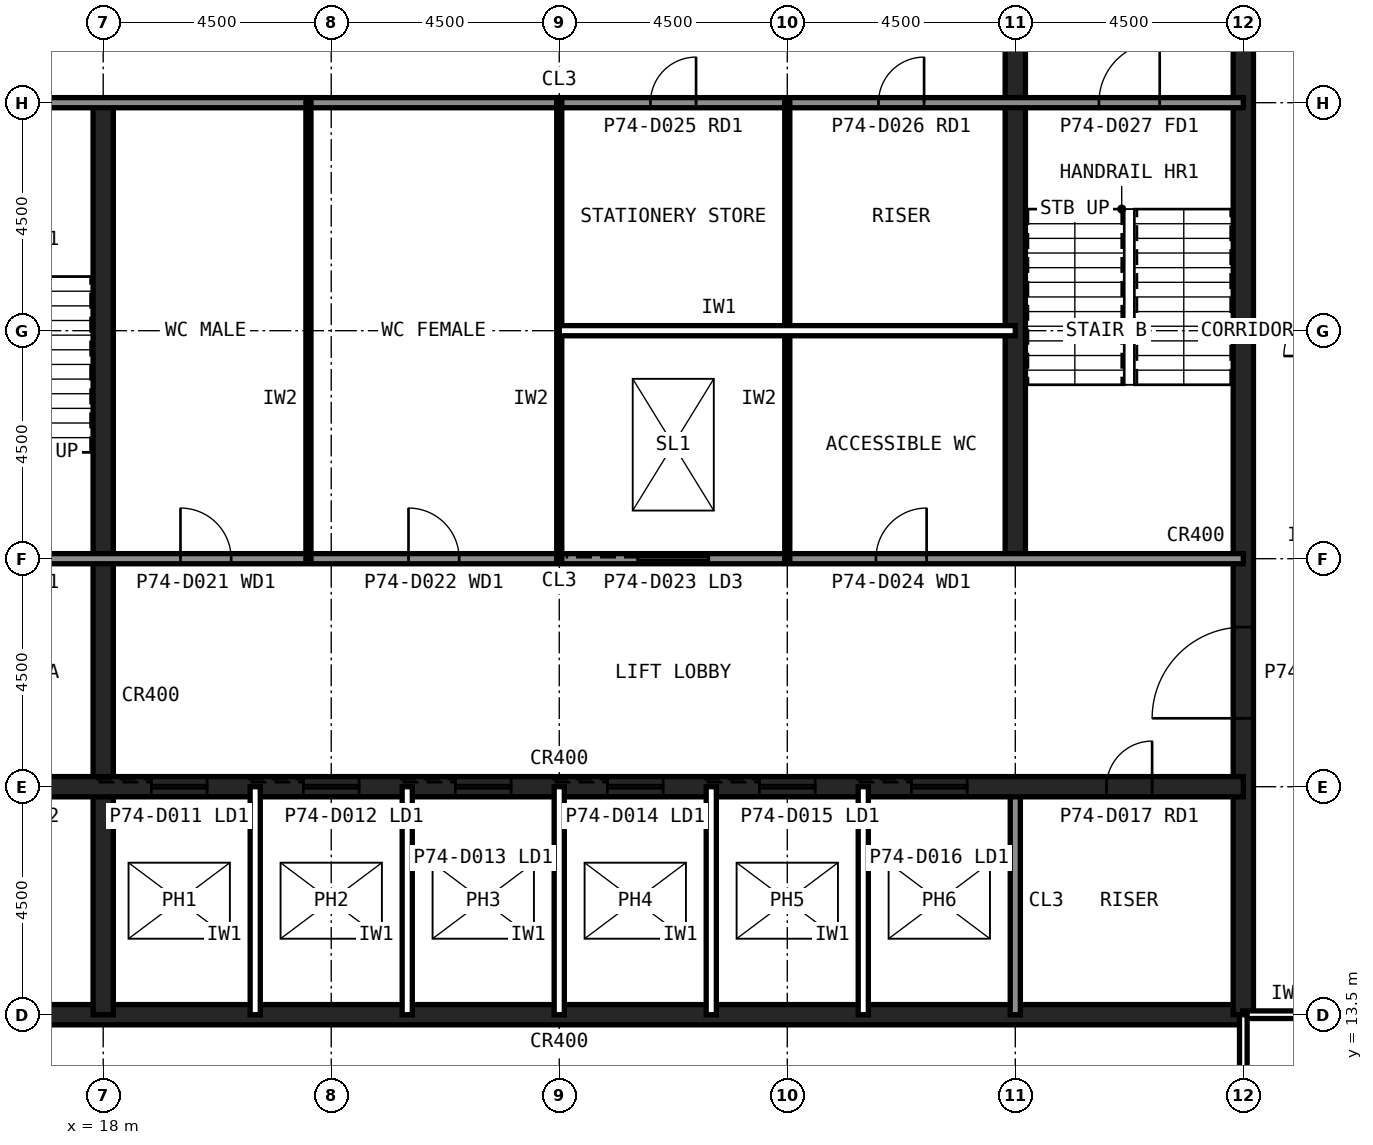
"""IFC4 building model, lengths in metres.
Left out: names, types, materials, properties, quantities, classifications, styles, units other than length and angle.
Written with IfcOpenShell. Run it as: python <this file> out.ifc"""

import sys

from ifc_helpers import new_model, si_unit, direction, frame, frame_2d, origin, place, context, subcontext, project, spatial, rectangle, extrude, element, fill, save


model = new_model("IFC4")
c1 = context("Model", 3, precision=1e-05, world=origin(), true_north=direction((0.0, 1.0)))
c2 = subcontext(c1, "Body", "Model", "MODEL_VIEW")
j1 = project(units=[si_unit("LENGTHUNIT", "METRE"), si_unit("PLANEANGLEUNIT", "RADIAN")], contexts=[c1])
p1 = place(None, origin())
s1 = spatial("IfcSite", under=j1, at=p1, CompositionType="ELEMENT")
p2 = place(p1, origin())
s2 = spatial("IfcBuilding", under=s1, at=p2, CompositionType="ELEMENT")
p3 = place(p2, frame((0.0, 0.0, 310.6)))
s3 = spatial("IfcBuildingStorey", under=s2, at=p3, CompositionType="ELEMENT", Elevation=310.6)
p4 = place(p3, frame((13.5, 13.5, 0.0), z_axis=(0.0, 0.0, 1.0), x_axis=(1.0, 0.0, 0.0)))
e1 = element("IfcWall", 1, at=p4, inside=s3, PredefinedType="SHEAR", context=c2, shape_type="SweptSolid", body=[
    extrude(rectangle(XDim=27.0, YDim=0.4, at=frame_2d((13.5, 0.0))), origin(), (0.0, 0.0, 1.0), 4.5),
])
p5 = place(p3, frame((40.5, 13.5, 0.0), z_axis=(0.0, 0.0, 1.0), x_axis=(0.0, 1.0, 0.0)))
e2 = element("IfcWall", 2, at=p5, inside=s3, PredefinedType="SHEAR", context=c2, shape_type="SweptSolid", body=[
    extrude(rectangle(XDim=27.0, YDim=0.4, at=frame_2d((13.5, 0.0))), origin(), (0.0, 0.0, 1.0), 4.5),
])
p6 = place(p5, frame((5.85, 0.0, 0.0)))
e3 = element("IfcOpeningElement", 3, at=p6, cuts=e2, PredefinedType="OPENING", context=c2, shape_type="SweptSolid", body=[
    extrude(rectangle(XDim=1.8, YDim=2.1, at=frame_2d((0.9, 1.05))), frame((0.0, 0.21, 0.0), z_axis=(0.0, -1.0, 0.0), x_axis=(1.0, 0.0, 0.0)), (0.0, 0.0, 1.0), 0.42),
])
p7 = place(p5, frame((19.65, 0.0, 0.0)))
e4 = element("IfcOpeningElement", 4, at=p7, cuts=e2, PredefinedType="OPENING", context=c2, shape_type="SweptSolid", body=[
    extrude(rectangle(XDim=1.2, YDim=2.1, at=frame_2d((0.6, 1.05))), frame((0.0, 0.21, 0.0), z_axis=(0.0, -1.0, 0.0), x_axis=(1.0, 0.0, 0.0)), (0.0, 0.0, 1.0), 0.42),
])
p8 = place(p3, frame((18.0, 13.5, 0.0), z_axis=(0.0, 0.0, 1.0), x_axis=(0.0, 1.0, 0.0)))
e5 = element("IfcWall", 5, at=p8, inside=s3, PredefinedType="SHEAR", context=c2, shape_type="SweptSolid", body=[
    extrude(rectangle(XDim=18.0, YDim=0.4, at=frame_2d((9.0, 0.0))), origin(), (0.0, 0.0, 1.0), 4.5),
])
p9 = place(p3, frame((36.0, 13.5, 0.0), z_axis=(0.0, 0.0, 1.0), x_axis=(0.0, 1.0, 0.0)))
e6 = element("IfcWall", 6, at=p9, inside=s3, PredefinedType="SOLIDWALL", context=c2, shape_type="SweptSolid", body=[
    extrude(rectangle(XDim=4.5, YDim=0.2, at=frame_2d((2.25, 0.0))), origin(), (0.0, 0.0, 1.0), 4.32),
])
p10 = place(p3, frame((36.0, 22.5, 0.0), z_axis=(0.0, 0.0, 1.0), x_axis=(0.0, 1.0, 0.0)))
e7 = element("IfcWall", 7, at=p10, inside=s3, PredefinedType="SHEAR", context=c2, shape_type="SweptSolid", body=[
    extrude(rectangle(XDim=18.0, YDim=0.4, at=frame_2d((9.0, 0.0))), origin(), (0.0, 0.0, 1.0), 4.5),
])
p11 = place(p3, frame((13.5, 18.0, 0.0), z_axis=(0.0, 0.0, 1.0), x_axis=(1.0, 0.0, 0.0)))
e8 = element("IfcWall", 8, at=p11, inside=s3, PredefinedType="SHEAR", context=c2, shape_type="SweptSolid", body=[
    extrude(rectangle(XDim=27.0, YDim=0.4, at=frame_2d((13.5, 0.0))), origin(), (0.0, 0.0, 1.0), 4.5),
])
p12 = place(p11, frame((24.3, 0.0, 0.0)))
e9 = element("IfcOpeningElement", 9, at=p12, cuts=e8, PredefinedType="OPENING", context=c2, shape_type="SweptSolid", body=[
    extrude(rectangle(XDim=0.9, YDim=2.1, at=frame_2d((0.45, 1.05))), frame((0.0, 0.21, 0.0), z_axis=(0.0, -1.0, 0.0), x_axis=(1.0, 0.0, 0.0)), (0.0, 0.0, 1.0), 0.42),
])
p13 = place(p11, frame((5.45, 0.0, 0.0)))
e10 = element("IfcOpeningElement", 10, at=p13, cuts=e8, PredefinedType="OPENING", context=c2, shape_type="SweptSolid", body=[
    extrude(rectangle(XDim=1.1, YDim=2.1, at=frame_2d((0.55, 1.05))), frame((0.0, 0.21, 0.0), z_axis=(0.0, -1.0, 0.0), x_axis=(1.0, 0.0, 0.0)), (0.0, 0.0, 1.0), 0.42),
])
p14 = place(p11, frame((8.45, 0.0, 0.0)))
e11 = element("IfcOpeningElement", 11, at=p14, cuts=e8, PredefinedType="OPENING", context=c2, shape_type="SweptSolid", body=[
    extrude(rectangle(XDim=1.1, YDim=2.1, at=frame_2d((0.55, 1.05))), frame((0.0, 0.21, 0.0), z_axis=(0.0, -1.0, 0.0), x_axis=(1.0, 0.0, 0.0)), (0.0, 0.0, 1.0), 0.42),
])
p15 = place(p11, frame((11.45, 0.0, 0.0)))
e12 = element("IfcOpeningElement", 12, at=p15, cuts=e8, PredefinedType="OPENING", context=c2, shape_type="SweptSolid", body=[
    extrude(rectangle(XDim=1.1, YDim=2.1, at=frame_2d((0.55, 1.05))), frame((0.0, 0.21, 0.0), z_axis=(0.0, -1.0, 0.0), x_axis=(1.0, 0.0, 0.0)), (0.0, 0.0, 1.0), 0.42),
])
p16 = place(p11, frame((14.45, 0.0, 0.0)))
e13 = element("IfcOpeningElement", 13, at=p16, cuts=e8, PredefinedType="OPENING", context=c2, shape_type="SweptSolid", body=[
    extrude(rectangle(XDim=1.1, YDim=2.1, at=frame_2d((0.55, 1.05))), frame((0.0, 0.21, 0.0), z_axis=(0.0, -1.0, 0.0), x_axis=(1.0, 0.0, 0.0)), (0.0, 0.0, 1.0), 0.42),
])
p17 = place(p11, frame((17.45, 0.0, 0.0)))
e14 = element("IfcOpeningElement", 14, at=p17, cuts=e8, PredefinedType="OPENING", context=c2, shape_type="SweptSolid", body=[
    extrude(rectangle(XDim=1.1, YDim=2.1, at=frame_2d((0.55, 1.05))), frame((0.0, 0.21, 0.0), z_axis=(0.0, -1.0, 0.0), x_axis=(1.0, 0.0, 0.0)), (0.0, 0.0, 1.0), 0.42),
])
p18 = place(p11, frame((20.45, 0.0, 0.0)))
e15 = element("IfcOpeningElement", 15, at=p18, cuts=e8, PredefinedType="OPENING", context=c2, shape_type="SweptSolid", body=[
    extrude(rectangle(XDim=1.1, YDim=2.1, at=frame_2d((0.55, 1.05))), frame((0.0, 0.21, 0.0), z_axis=(0.0, -1.0, 0.0), x_axis=(1.0, 0.0, 0.0)), (0.0, 0.0, 1.0), 0.42),
])
p19 = place(p11, frame((1.6, 0.0, 0.0)))
e16 = element("IfcOpeningElement", 16, at=p19, cuts=e8, PredefinedType="OPENING", context=c2, shape_type="SweptSolid", body=[
    extrude(rectangle(XDim=1.3, YDim=2.2, at=frame_2d((0.65, 1.1))), frame((0.0, 0.21, 0.0), z_axis=(0.0, -1.0, 0.0), x_axis=(1.0, 0.0, 0.0)), (0.0, 0.0, 1.0), 0.42),
])
p20 = place(p3, frame((13.5, 22.5, 0.0), z_axis=(0.0, 0.0, 1.0), x_axis=(1.0, 0.0, 0.0)))
e17 = element("IfcWall", 17, at=p20, inside=s3, PredefinedType="SOLIDWALL", context=c2, shape_type="SweptSolid", body=[
    extrude(rectangle(XDim=27.0, YDim=0.2, at=frame_2d((13.5, 0.0))), origin(), (0.0, 0.0, 1.0), 4.32),
])
p21 = place(p20, frame((1.65, 0.0, 0.0)))
e18 = element("IfcOpeningElement", 18, at=p21, cuts=e17, PredefinedType="OPENING", context=c2, shape_type="SweptSolid", body=[
    extrude(rectangle(XDim=1.2, YDim=2.1, at=frame_2d((0.6, 1.05))), frame((0.0, 0.11, 0.0), z_axis=(0.0, -1.0, 0.0), x_axis=(1.0, 0.0, 0.0)), (0.0, 0.0, 1.0), 0.22),
])
p22 = place(p20, frame((6.025, 0.0, 0.0)))
e19 = element("IfcOpeningElement", 19, at=p22, cuts=e17, PredefinedType="OPENING", context=c2, shape_type="SweptSolid", body=[
    extrude(rectangle(XDim=1.0, YDim=2.1, at=frame_2d((0.5, 1.05))), frame((0.0, 0.11, 0.0), z_axis=(0.0, -1.0, 0.0), x_axis=(1.0, 0.0, 0.0)), (0.0, 0.0, 1.0), 0.22),
])
p23 = place(p20, frame((10.525, 0.0, 0.0)))
e20 = element("IfcOpeningElement", 20, at=p23, cuts=e17, PredefinedType="OPENING", context=c2, shape_type="SweptSolid", body=[
    extrude(rectangle(XDim=1.0, YDim=2.1, at=frame_2d((0.5, 1.05))), frame((0.0, 0.11, 0.0), z_axis=(0.0, -1.0, 0.0), x_axis=(1.0, 0.0, 0.0)), (0.0, 0.0, 1.0), 0.22),
])
p24 = place(p20, frame((19.75, 0.0, 0.0)))
e21 = element("IfcOpeningElement", 21, at=p24, cuts=e17, PredefinedType="OPENING", context=c2, shape_type="SweptSolid", body=[
    extrude(rectangle(XDim=1.0, YDim=2.1, at=frame_2d((0.5, 1.05))), frame((0.0, 0.11, 0.0), z_axis=(0.0, -1.0, 0.0), x_axis=(1.0, 0.0, 0.0)), (0.0, 0.0, 1.0), 0.22),
])
p25 = place(p20, frame((15.05, 0.0, 0.0)))
e22 = element("IfcOpeningElement", 22, at=p25, cuts=e17, PredefinedType="OPENING", context=c2, shape_type="SweptSolid", body=[
    extrude(rectangle(XDim=1.4, YDim=2.4, at=frame_2d((0.7, 1.2))), frame((0.0, 0.11, 0.0), z_axis=(0.0, -1.0, 0.0), x_axis=(1.0, 0.0, 0.0)), (0.0, 0.0, 1.0), 0.22),
])
p26 = place(p3, frame((13.5, 31.5, 0.0), z_axis=(0.0, 0.0, 1.0), x_axis=(1.0, 0.0, 0.0)))
e23 = element("IfcWall", 23, at=p26, inside=s3, PredefinedType="SOLIDWALL", context=c2, shape_type="SweptSolid", body=[
    extrude(rectangle(XDim=27.0, YDim=0.2, at=frame_2d((13.5, 0.0))), origin(), (0.0, 0.0, 1.0), 4.32),
])
p27 = place(p26, frame((24.15, 0.0, 0.0)))
e24 = element("IfcOpeningElement", 24, at=p27, cuts=e23, PredefinedType="OPENING", context=c2, shape_type="SweptSolid", body=[
    extrude(rectangle(XDim=1.2, YDim=2.1, at=frame_2d((0.6, 1.05))), frame((0.0, 0.11, 0.0), z_axis=(0.0, -1.0, 0.0), x_axis=(1.0, 0.0, 0.0)), (0.0, 0.0, 1.0), 0.22),
])
p28 = place(p26, frame((15.3, 0.0, 0.0)))
e25 = element("IfcOpeningElement", 25, at=p28, cuts=e23, PredefinedType="OPENING", context=c2, shape_type="SweptSolid", body=[
    extrude(rectangle(XDim=0.9, YDim=2.1, at=frame_2d((0.45, 1.05))), frame((0.0, 0.11, 0.0), z_axis=(0.0, -1.0, 0.0), x_axis=(1.0, 0.0, 0.0)), (0.0, 0.0, 1.0), 0.22),
])
p29 = place(p26, frame((19.8, 0.0, 0.0)))
e26 = element("IfcOpeningElement", 26, at=p29, cuts=e23, PredefinedType="OPENING", context=c2, shape_type="SweptSolid", body=[
    extrude(rectangle(XDim=0.9, YDim=2.1, at=frame_2d((0.45, 1.05))), frame((0.0, 0.11, 0.0), z_axis=(0.0, -1.0, 0.0), x_axis=(1.0, 0.0, 0.0)), (0.0, 0.0, 1.0), 0.22),
])
for number, where, z_axis, x_axis in (
    (27, (21.0, 13.5, 0.0), (0.0, 0.0, 1.0), (0.0, 1.0, 0.0)),
    (28, (24.0, 13.5, 0.0), (0.0, 0.0, 1.0), (0.0, 1.0, 0.0)),
    (29, (27.0, 13.5, 0.0), (0.0, 0.0, 1.0), (0.0, 1.0, 0.0)),
    (30, (30.0, 13.5, 0.0), (0.0, 0.0, 1.0), (0.0, 1.0, 0.0)),
    (31, (33.0, 13.5, 0.0), (0.0, 0.0, 1.0), (0.0, 1.0, 0.0)),
):
    element("IfcWall", number, at=place(p3, frame(where, z_axis=z_axis, x_axis=x_axis)), inside=s3, PredefinedType="PARTITIONING", context=c2, shape_type="SweptSolid", body=[
        extrude(rectangle(XDim=4.5, YDim=0.2, at=frame_2d((2.25, 0.0))), origin(), (0.0, 0.0, 1.0), 4.32),
    ])
for number, where, z_axis, x_axis in (
    (32, (22.05, 22.5, 0.0), (0.0, 0.0, 1.0), (0.0, 1.0, 0.0)),
    (33, (27.0, 22.5, 0.0), (0.0, 0.0, 1.0), (0.0, 1.0, 0.0)),
    (34, (31.5, 22.5, 0.0), (0.0, 0.0, 1.0), (0.0, 1.0, 0.0)),
):
    element("IfcWall", number, at=place(p3, frame(where, z_axis=z_axis, x_axis=x_axis)), inside=s3, PredefinedType="PLUMBINGWALL", context=c2, shape_type="SweptSolid", body=[
        extrude(rectangle(XDim=9.0, YDim=0.1, at=frame_2d((4.5, 0.0))), origin(), (0.0, 0.0, 1.0), 4.32),
    ])
p30 = place(p3, frame((27.0, 27.0, 0.0), z_axis=(0.0, 0.0, 1.0), x_axis=(1.0, 0.0, 0.0)))
e35 = element("IfcWall", 35, at=p30, inside=s3, PredefinedType="PARTITIONING", context=c2, shape_type="SweptSolid", body=[
    extrude(rectangle(XDim=9.0, YDim=0.2, at=frame_2d((4.5, 0.0))), origin(), (0.0, 0.0, 1.0), 4.32),
])
p31 = place(p3, frame((40.49, 13.5, 0.0), z_axis=(0.0, 0.0, 1.0), x_axis=(1.0, 0.0, 0.0)))
e36 = element("IfcWall", 36, at=p31, inside=s3, PredefinedType="PARTITIONING", context=c2, shape_type="SweptSolid", body=[
    extrude(rectangle(XDim=1.81, YDim=0.15, at=frame_2d((0.905, 0.0))), origin(), (0.0, 0.0, 1.0), 3.393),
])
p32 = place(p3, frame((40.5, 4.795, 0.0), z_axis=(0.0, 0.0, 1.0), x_axis=(0.0, 1.0, 0.0)))
e37 = element("IfcWall", 37, at=p32, inside=s3, PredefinedType="PARTITIONING", context=c2, shape_type="SweptSolid", body=[
    extrude(rectangle(XDim=8.705, YDim=0.15, at=frame_2d((4.353, 0.0))), origin(), (0.0, 0.0, 1.0), 3.393),
])
p33 = place(p32, frame((3.853, 0.0, 0.0)))
e38 = element("IfcOpeningElement", 38, at=p33, cuts=e37, PredefinedType="OPENING", context=c2, shape_type="SweptSolid", body=[
    extrude(rectangle(XDim=1.0, YDim=2.1, at=frame_2d((0.5, 1.05))), frame((0.0, 0.085, 0.0), z_axis=(0.0, -1.0, 0.0), x_axis=(1.0, 0.0, 0.0)), (0.0, 0.0, 1.0), 0.17),
])
p34 = place(p6, origin())
e39 = element("IfcDoor", 39, at=p34, inside=s3, OperationType="SINGLE_SWING_LEFT", PredefinedType="DOOR", context=c2, shape_type="SweptSolid", body=[
    extrude(rectangle(XDim=1.8, YDim=2.1, at=frame_2d((0.9, 1.05))), frame((0.0, 0.025, 0.0), z_axis=(0.0, -1.0, 0.0), x_axis=(1.0, 0.0, 0.0)), (0.0, 0.0, 1.0), 0.05),
])
fill(e3, e39)
p35 = place(p27, origin())
e40 = element("IfcDoor", 40, at=p35, inside=s3, OperationType="SINGLE_SWING_RIGHT", PredefinedType="DOOR", context=c2, shape_type="SweptSolid", body=[
    extrude(rectangle(XDim=1.2, YDim=2.1, at=frame_2d((0.6, 1.05))), frame((0.0, 0.025, 0.0), z_axis=(0.0, -1.0, 0.0), x_axis=(1.0, 0.0, 0.0)), (0.0, 0.0, 1.0), 0.05),
])
fill(e24, e40)
p36 = place(p22, origin())
e41 = element("IfcDoor", 41, at=p36, inside=s3, OperationType="SINGLE_SWING_LEFT", PredefinedType="DOOR", context=c2, shape_type="SweptSolid", body=[
    extrude(rectangle(XDim=1.0, YDim=2.1, at=frame_2d((0.5, 1.05))), frame((0.0, 0.025, 0.0), z_axis=(0.0, -1.0, 0.0), x_axis=(1.0, 0.0, 0.0)), (0.0, 0.0, 1.0), 0.05),
])
fill(e19, e41)
p37 = place(p23, origin())
e42 = element("IfcDoor", 42, at=p37, inside=s3, OperationType="SINGLE_SWING_LEFT", PredefinedType="DOOR", context=c2, shape_type="SweptSolid", body=[
    extrude(rectangle(XDim=1.0, YDim=2.1, at=frame_2d((0.5, 1.05))), frame((0.0, 0.025, 0.0), z_axis=(0.0, -1.0, 0.0), x_axis=(1.0, 0.0, 0.0)), (0.0, 0.0, 1.0), 0.05),
])
fill(e20, e42)
p38 = place(p24, origin())
e43 = element("IfcDoor", 43, at=p38, inside=s3, OperationType="SINGLE_SWING_RIGHT", PredefinedType="DOOR", context=c2, shape_type="SweptSolid", body=[
    extrude(rectangle(XDim=1.0, YDim=2.1, at=frame_2d((0.5, 1.05))), frame((0.0, 0.025, 0.0), z_axis=(0.0, -1.0, 0.0), x_axis=(1.0, 0.0, 0.0)), (0.0, 0.0, 1.0), 0.05),
])
fill(e21, e43)
p39 = place(p28, origin())
e44 = element("IfcDoor", 44, at=p39, inside=s3, OperationType="SINGLE_SWING_RIGHT", PredefinedType="DOOR", context=c2, shape_type="SweptSolid", body=[
    extrude(rectangle(XDim=0.9, YDim=2.1, at=frame_2d((0.45, 1.05))), frame((0.0, 0.025, 0.0), z_axis=(0.0, -1.0, 0.0), x_axis=(1.0, 0.0, 0.0)), (0.0, 0.0, 1.0), 0.05),
])
fill(e25, e44)
p40 = place(p29, origin())
e45 = element("IfcDoor", 45, at=p40, inside=s3, OperationType="SINGLE_SWING_RIGHT", PredefinedType="DOOR", context=c2, shape_type="SweptSolid", body=[
    extrude(rectangle(XDim=0.9, YDim=2.1, at=frame_2d((0.45, 1.05))), frame((0.0, 0.025, 0.0), z_axis=(0.0, -1.0, 0.0), x_axis=(1.0, 0.0, 0.0)), (0.0, 0.0, 1.0), 0.05),
])
fill(e26, e45)
p41 = place(p12, origin())
e46 = element("IfcDoor", 46, at=p41, inside=s3, OperationType="SINGLE_SWING_RIGHT", PredefinedType="DOOR", context=c2, shape_type="SweptSolid", body=[
    extrude(rectangle(XDim=0.9, YDim=2.1, at=frame_2d((0.45, 1.05))), frame((0.0, 0.025, 0.0), z_axis=(0.0, -1.0, 0.0), x_axis=(1.0, 0.0, 0.0)), (0.0, 0.0, 1.0), 0.05),
])
fill(e9, e46)
p42 = place(p13, origin())
e47 = element("IfcDoor", 47, at=p42, inside=s3, OperationType="SLIDING_TO_LEFT", PredefinedType="DOOR", context=c2, shape_type="SweptSolid", body=[
    extrude(rectangle(XDim=1.1, YDim=2.1, at=frame_2d((0.55, 1.05))), frame((0.0, 0.025, 0.0), z_axis=(0.0, -1.0, 0.0), x_axis=(1.0, 0.0, 0.0)), (0.0, 0.0, 1.0), 0.05),
])
fill(e10, e47)
p43 = place(p14, origin())
e48 = element("IfcDoor", 48, at=p43, inside=s3, OperationType="SLIDING_TO_LEFT", PredefinedType="DOOR", context=c2, shape_type="SweptSolid", body=[
    extrude(rectangle(XDim=1.1, YDim=2.1, at=frame_2d((0.55, 1.05))), frame((0.0, 0.025, 0.0), z_axis=(0.0, -1.0, 0.0), x_axis=(1.0, 0.0, 0.0)), (0.0, 0.0, 1.0), 0.05),
])
fill(e11, e48)
p44 = place(p15, origin())
e49 = element("IfcDoor", 49, at=p44, inside=s3, OperationType="SLIDING_TO_LEFT", PredefinedType="DOOR", context=c2, shape_type="SweptSolid", body=[
    extrude(rectangle(XDim=1.1, YDim=2.1, at=frame_2d((0.55, 1.05))), frame((0.0, 0.025, 0.0), z_axis=(0.0, -1.0, 0.0), x_axis=(1.0, 0.0, 0.0)), (0.0, 0.0, 1.0), 0.05),
])
fill(e12, e49)
p45 = place(p16, origin())
e50 = element("IfcDoor", 50, at=p45, inside=s3, OperationType="SLIDING_TO_LEFT", PredefinedType="DOOR", context=c2, shape_type="SweptSolid", body=[
    extrude(rectangle(XDim=1.1, YDim=2.1, at=frame_2d((0.55, 1.05))), frame((0.0, 0.025, 0.0), z_axis=(0.0, -1.0, 0.0), x_axis=(1.0, 0.0, 0.0)), (0.0, 0.0, 1.0), 0.05),
])
fill(e13, e50)
p46 = place(p17, origin())
e51 = element("IfcDoor", 51, at=p46, inside=s3, OperationType="SLIDING_TO_LEFT", PredefinedType="DOOR", context=c2, shape_type="SweptSolid", body=[
    extrude(rectangle(XDim=1.1, YDim=2.1, at=frame_2d((0.55, 1.05))), frame((0.0, 0.025, 0.0), z_axis=(0.0, -1.0, 0.0), x_axis=(1.0, 0.0, 0.0)), (0.0, 0.0, 1.0), 0.05),
])
fill(e14, e51)
p47 = place(p18, origin())
e52 = element("IfcDoor", 52, at=p47, inside=s3, OperationType="SLIDING_TO_LEFT", PredefinedType="DOOR", context=c2, shape_type="SweptSolid", body=[
    extrude(rectangle(XDim=1.1, YDim=2.1, at=frame_2d((0.55, 1.05))), frame((0.0, 0.025, 0.0), z_axis=(0.0, -1.0, 0.0), x_axis=(1.0, 0.0, 0.0)), (0.0, 0.0, 1.0), 0.05),
])
fill(e15, e52)
p48 = place(p25, origin())
e53 = element("IfcDoor", 53, at=p48, inside=s3, OperationType="SLIDING_TO_LEFT", PredefinedType="DOOR", context=c2, shape_type="SweptSolid", body=[
    extrude(rectangle(XDim=1.4, YDim=2.4, at=frame_2d((0.7, 1.2))), frame((0.0, 0.025, 0.0), z_axis=(0.0, -1.0, 0.0), x_axis=(1.0, 0.0, 0.0)), (0.0, 0.0, 1.0), 0.05),
])
fill(e22, e53)
save(model, sys.argv[1])
